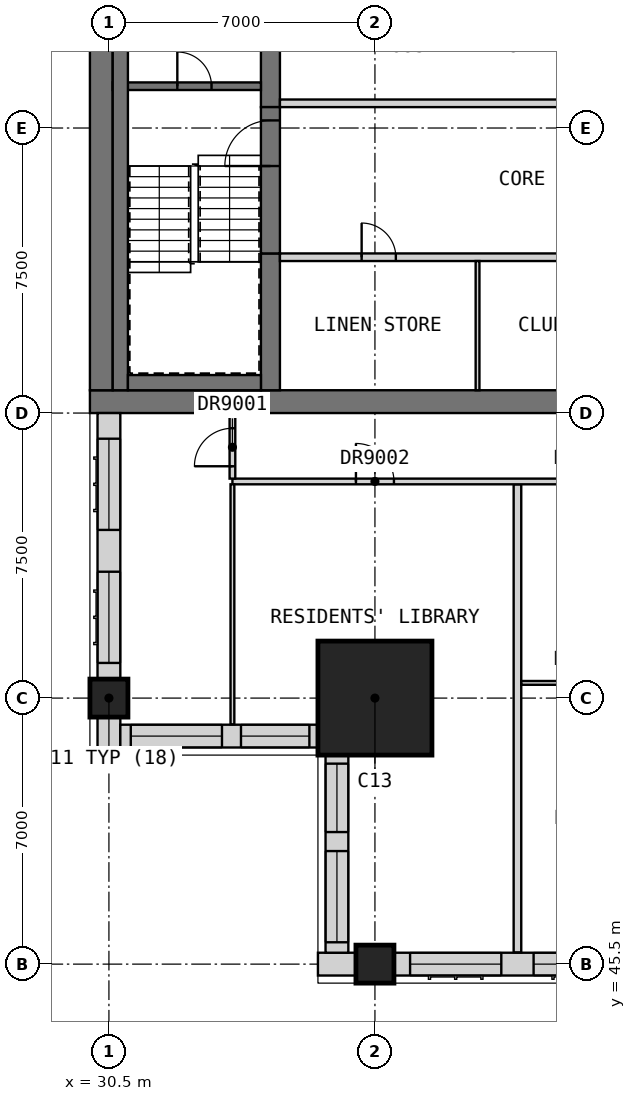
"""IFC4 building model, lengths in metres.
Left out: names, types, materials, properties, quantities, classifications, styles, units other than length and angle.
Written with IfcOpenShell. Run it as: python <this file> out.ifc"""

import sys

from ifc_helpers import new_model, si_unit, direction, frame, frame_2d, origin, origin_2d, place, context, subcontext, project, spatial, rectangle, extrude, element, fill, save


model = new_model("IFC4")
c1 = context("Model", 3, precision=1e-05, world=origin(), true_north=direction((0.0, 1.0)))
c2 = subcontext(c1, "Body", "Model", "MODEL_VIEW")
j1 = project(units=[si_unit("LENGTHUNIT", "METRE"), si_unit("PLANEANGLEUNIT", "RADIAN")], contexts=[c1])
p1 = place(None, origin())
s1 = spatial("IfcSite", under=j1, at=p1, CompositionType="ELEMENT")
p2 = place(p1, origin())
s2 = spatial("IfcBuilding", under=s1, at=p2, CompositionType="ELEMENT")
p3 = place(p2, frame((0.0, 0.0, 269.7)))
s3 = spatial("IfcBuildingStorey", under=s2, at=p3, CompositionType="ELEMENT", Elevation=269.7)
for number, where, z_axis, x_axis in (
    (1, (30.5, 52.5, 0.0), (0.0, 0.0, 1.0), (1.0, 0.0, 0.0)),
    (2, (37.5, 45.5, 0.0), (0.0, 0.0, 1.0), (1.0, 0.0, 0.0)),
):
    element("IfcColumn", number, at=place(p3, frame(where, z_axis=z_axis, x_axis=x_axis)), inside=s3, PredefinedType="COLUMN", context=c2, shape_type="SweptSolid", body=[
        extrude(rectangle(XDim=1.0, YDim=1.0, at=origin_2d()), origin(), (0.0, 0.0, 1.0), 3.5),
    ])
p4 = place(p3, frame((37.5, 52.5, 0.0), z_axis=(0.0, 0.0, 1.0), x_axis=(1.0, 0.0, 0.0)))
e3 = element("IfcColumn", 3, at=p4, inside=s3, PredefinedType="COLUMN", context=c2, shape_type="SweptSolid", body=[
    extrude(rectangle(XDim=3.0, YDim=3.0, at=origin_2d()), origin(), (0.0, 0.0, 1.0), 3.5),
])
p5 = place(p3, frame((30.0, 60.3, 0.0), z_axis=(0.0, 0.0, 1.0), x_axis=(1.0, 0.0, 0.0)))
e4 = element("IfcWall", 4, at=p5, inside=s3, PredefinedType="SHEAR", context=c2, shape_type="SweptSolid", body=[
    extrude(rectangle(XDim=30.0, YDim=0.6, at=frame_2d((15.0, 0.0))), origin(), (0.0, 0.0, 1.0), 3.5),
])
p6 = place(p5, frame((21.9, 0.0, 0.0)))
e5 = element("IfcOpeningElement", 5, at=p6, cuts=e4, PredefinedType="OPENING", context=c2, shape_type="SweptSolid", body=[
    extrude(rectangle(XDim=1.8, YDim=2.1, at=frame_2d((0.9, 1.05))), frame((0.0, 0.31, 0.0), z_axis=(0.0, -1.0, 0.0), x_axis=(1.0, 0.0, 0.0)), (0.0, 0.0, 1.0), 0.62),
])
p7 = place(p5, frame((26.5, 0.0, 0.0)))
e6 = element("IfcOpeningElement", 6, at=p7, cuts=e4, PredefinedType="OPENING", context=c2, shape_type="SweptSolid", body=[
    extrude(rectangle(XDim=1.2, YDim=2.1, at=frame_2d((0.6, 1.05))), frame((0.0, 0.31, 0.0), z_axis=(0.0, -1.0, 0.0), x_axis=(1.0, 0.0, 0.0)), (0.0, 0.0, 1.0), 0.62),
])
p8 = place(p3, frame((30.3, 60.6, 0.0), z_axis=(0.0, 0.0, 1.0), x_axis=(0.0, 1.0, 0.0)))
e7 = element("IfcWall", 7, at=p8, inside=s3, PredefinedType="SHEAR", context=c2, shape_type="SweptSolid", body=[
    extrude(rectangle(XDim=21.3, YDim=0.6, at=frame_2d((10.65, 0.0))), origin(), (0.0, 0.0, 1.0), 3.5),
])
p9 = place(p3, frame((34.75, 60.6, 0.0), z_axis=(0.0, 0.0, 1.0), x_axis=(0.0, 1.0, 0.0)))
e8 = element("IfcWall", 8, at=p9, inside=s3, PredefinedType="SHEAR", context=c2, shape_type="SweptSolid", body=[
    extrude(rectangle(XDim=3.6, YDim=0.5, at=frame_2d((1.8, 0.0))), origin(), (0.0, 0.0, 1.0), 3.5),
])
p10 = place(p3, frame((34.75, 68.05, 0.0), z_axis=(0.0, 0.0, 1.0), x_axis=(0.0, 1.0, 0.0)))
e9 = element("IfcWall", 9, at=p10, inside=s3, PredefinedType="SHEAR", context=c2, shape_type="SweptSolid", body=[
    extrude(rectangle(XDim=6.4, YDim=0.5, at=frame_2d((3.2, 0.0))), origin(), (0.0, 0.0, 1.0), 3.5),
])
p11 = place(p2, frame((0.0, 0.0, 34.0)))
s4 = spatial("IfcBuildingStorey", under=s2, at=p11, CompositionType="ELEMENT", Elevation=34.0)
for number, where, z_axis, x_axis in (
    (10, (29.7, 61.05, 0.0), (0.0, 0.0, 1.0), (0.0, 1.0, 0.0)),
    (11, (29.7, 65.925, 0.0), (0.0, 0.0, 1.0), (0.0, 1.0, 0.0)),
):
    element("IfcWall", number, at=place(p11, frame(where, z_axis=z_axis, x_axis=x_axis)), inside=s4, PredefinedType="SOLIDWALL", context=c2, shape_type="SweptSolid", body=[
        extrude(rectangle(XDim=0.9, YDim=0.6, at=frame_2d((0.45, 0.0))), origin(), (0.0, 0.0, 1.0), 286.2),
    ])
p12 = place(p3, frame((36.0, 45.5, 0.0), z_axis=(0.0, 0.0, 1.0), x_axis=(1.0, 0.0, 0.0)))
e12 = element("IfcWall", 12, at=p12, inside=s3, PredefinedType="SOLIDWALL", context=c2, shape_type="SweptSolid", body=[
    extrude(rectangle(XDim=1.0, YDim=0.6, at=frame_2d((0.5, 0.0))), origin(), (0.0, 0.0, 1.0), 3.25),
])
p13 = place(p3, frame((38.0, 45.5, 0.0), z_axis=(0.0, 0.0, 1.0), x_axis=(1.0, 0.0, 0.0)))
e13 = element("IfcWall", 13, at=p13, inside=s3, PredefinedType="SOLIDWALL", context=c2, shape_type="SweptSolid", body=[
    extrude(rectangle(XDim=6.5, YDim=0.6, at=frame_2d((3.25, 0.0))), origin(), (0.0, 0.0, 1.0), 2.75),
])
p14 = place(p13, frame((0.425, 0.0, 0.8)))
e14 = element("IfcOpeningElement", 14, at=p14, cuts=e13, PredefinedType="OPENING", context=c2, shape_type="SweptSolid", body=[
    extrude(rectangle(XDim=2.4, YDim=1.8, at=frame_2d((1.2, 0.9))), frame((0.0, 0.31, 0.0), z_axis=(0.0, -1.0, 0.0), x_axis=(1.0, 0.0, 0.0)), (0.0, 0.0, 1.0), 0.62),
])
p15 = place(p13, frame((3.675, 0.0, 0.8)))
e15 = element("IfcOpeningElement", 15, at=p15, cuts=e13, PredefinedType="OPENING", context=c2, shape_type="SweptSolid", body=[
    extrude(rectangle(XDim=2.4, YDim=1.8, at=frame_2d((1.2, 0.9))), frame((0.0, 0.31, 0.0), z_axis=(0.0, -1.0, 0.0), x_axis=(1.0, 0.0, 0.0)), (0.0, 0.0, 1.0), 0.62),
])
p16 = place(p3, frame((30.5, 60.0, 0.0), z_axis=(0.0, 0.0, 1.0), x_axis=(0.0, -1.0, 0.0)))
e16 = element("IfcWall", 16, at=p16, inside=s3, PredefinedType="SOLIDWALL", context=c2, shape_type="SweptSolid", body=[
    extrude(rectangle(XDim=7.0, YDim=0.6, at=frame_2d((3.5, 0.0))), origin(), (0.0, 0.0, 1.0), 3.25),
])
p17 = place(p16, frame((4.175, 0.0, 0.8)))
e17 = element("IfcOpeningElement", 17, at=p17, cuts=e16, PredefinedType="OPENING", context=c2, shape_type="SweptSolid", body=[
    extrude(rectangle(XDim=2.4, YDim=1.8, at=frame_2d((1.2, 0.9))), frame((0.0, 0.31, 0.0), z_axis=(0.0, -1.0, 0.0), x_axis=(1.0, 0.0, 0.0)), (0.0, 0.0, 1.0), 0.62),
])
p18 = place(p16, frame((0.675, 0.0, 0.8)))
e18 = element("IfcOpeningElement", 18, at=p18, cuts=e16, PredefinedType="OPENING", context=c2, shape_type="SweptSolid", body=[
    extrude(rectangle(XDim=2.4, YDim=1.8, at=frame_2d((1.2, 0.9))), frame((0.0, 0.31, 0.0), z_axis=(0.0, -1.0, 0.0), x_axis=(1.0, 0.0, 0.0)), (0.0, 0.0, 1.0), 0.62),
])
p19 = place(p3, frame((30.5, 52.0, 0.0), z_axis=(0.0, 0.0, 1.0), x_axis=(0.0, -1.0, 0.0)))
e19 = element("IfcWall", 19, at=p19, inside=s3, PredefinedType="SOLIDWALL", context=c2, shape_type="SweptSolid", body=[
    extrude(rectangle(XDim=1.0, YDim=0.6, at=frame_2d((0.5, 0.0))), origin(), (0.0, 0.0, 1.0), 3.25),
])
p20 = place(p3, frame((30.8, 51.5, 0.0), z_axis=(0.0, 0.0, 1.0), x_axis=(1.0, 0.0, 0.0)))
e20 = element("IfcWall", 20, at=p20, inside=s3, PredefinedType="SOLIDWALL", context=c2, shape_type="SweptSolid", body=[
    extrude(rectangle(XDim=5.2, YDim=0.6, at=frame_2d((2.6, 0.0))), origin(), (0.0, 0.0, 1.0), 3.25),
])
p21 = place(p20, frame((0.275, 0.0, 0.8)))
e21 = element("IfcOpeningElement", 21, at=p21, cuts=e20, PredefinedType="OPENING", context=c2, shape_type="SweptSolid", body=[
    extrude(rectangle(XDim=2.4, YDim=1.8, at=frame_2d((1.2, 0.9))), frame((0.0, 0.31, 0.0), z_axis=(0.0, -1.0, 0.0), x_axis=(1.0, 0.0, 0.0)), (0.0, 0.0, 1.0), 0.62),
])
p22 = place(p20, frame((3.175, 0.0, 0.8)))
e22 = element("IfcOpeningElement", 22, at=p22, cuts=e20, PredefinedType="OPENING", context=c2, shape_type="SweptSolid", body=[
    extrude(rectangle(XDim=1.8, YDim=1.8, at=frame_2d((0.9, 0.9))), frame((0.0, 0.31, 0.0), z_axis=(0.0, -1.0, 0.0), x_axis=(1.0, 0.0, 0.0)), (0.0, 0.0, 1.0), 0.62),
])
p23 = place(p3, frame((36.5, 51.0, 0.0), z_axis=(0.0, 0.0, 1.0), x_axis=(0.0, -1.0, 0.0)))
e23 = element("IfcWall", 23, at=p23, inside=s3, PredefinedType="SOLIDWALL", context=c2, shape_type="SweptSolid", body=[
    extrude(rectangle(XDim=5.2, YDim=0.6, at=frame_2d((2.6, 0.0))), origin(), (0.0, 0.0, 1.0), 3.25),
])
p24 = place(p23, frame((2.525, 0.0, 0.8)))
e24 = element("IfcOpeningElement", 24, at=p24, cuts=e23, PredefinedType="OPENING", context=c2, shape_type="SweptSolid", body=[
    extrude(rectangle(XDim=2.4, YDim=1.8, at=frame_2d((1.2, 0.9))), frame((0.0, 0.31, 0.0), z_axis=(0.0, -1.0, 0.0), x_axis=(1.0, 0.0, 0.0)), (0.0, 0.0, 1.0), 0.62),
])
p25 = place(p23, frame((0.225, 0.0, 0.8)))
e25 = element("IfcOpeningElement", 25, at=p25, cuts=e23, PredefinedType="OPENING", context=c2, shape_type="SweptSolid", body=[
    extrude(rectangle(XDim=1.8, YDim=1.8, at=frame_2d((0.9, 0.9))), frame((0.0, 0.31, 0.0), z_axis=(0.0, -1.0, 0.0), x_axis=(1.0, 0.0, 0.0)), (0.0, 0.0, 1.0), 0.62),
])
p26 = place(p3, frame((35.0, 64.1, 0.0), z_axis=(0.0, 0.0, 1.0), x_axis=(1.0, 0.0, 0.0)))
e26 = element("IfcWall", 26, at=p26, inside=s3, PredefinedType="PARTITIONING", context=c2, shape_type="SweptSolid", body=[
    extrude(rectangle(XDim=15.6, YDim=0.2, at=frame_2d((7.8, 0.0))), origin(), (0.0, 0.0, 1.0), 3.25),
])
p27 = place(p26, frame((2.15, 0.0, 0.0)))
e27 = element("IfcOpeningElement", 27, at=p27, cuts=e26, PredefinedType="OPENING", context=c2, shape_type="SweptSolid", body=[
    extrude(rectangle(XDim=0.9, YDim=2.1, at=frame_2d((0.45, 1.05))), frame((0.0, 0.11, 0.0), z_axis=(0.0, -1.0, 0.0), x_axis=(1.0, 0.0, 0.0)), (0.0, 0.0, 1.0), 0.22),
])
p28 = place(p26, frame((7.35, 0.0, 0.0)))
e28 = element("IfcOpeningElement", 28, at=p28, cuts=e26, PredefinedType="OPENING", context=c2, shape_type="SweptSolid", body=[
    extrude(rectangle(XDim=0.9, YDim=2.1, at=frame_2d((0.45, 1.05))), frame((0.0, 0.11, 0.0), z_axis=(0.0, -1.0, 0.0), x_axis=(1.0, 0.0, 0.0)), (0.0, 0.0, 1.0), 0.22),
])
p29 = place(p26, frame((12.55, 0.0, 0.0)))
e29 = element("IfcOpeningElement", 29, at=p29, cuts=e26, PredefinedType="OPENING", context=c2, shape_type="SweptSolid", body=[
    extrude(rectangle(XDim=0.9, YDim=2.1, at=frame_2d((0.45, 1.05))), frame((0.0, 0.11, 0.0), z_axis=(0.0, -1.0, 0.0), x_axis=(1.0, 0.0, 0.0)), (0.0, 0.0, 1.0), 0.22),
])
p30 = place(p3, frame((40.2, 60.6, 0.0), z_axis=(0.0, 0.0, 1.0), x_axis=(0.0, 1.0, 0.0)))
e30 = element("IfcWall", 30, at=p30, inside=s3, PredefinedType="PARTITIONING", context=c2, shape_type="SweptSolid", body=[
    extrude(rectangle(XDim=3.4, YDim=0.1, at=frame_2d((1.7, 0.0))), origin(), (0.0, 0.0, 1.0), 3.25),
])
p31 = place(p3, frame((35.0, 68.15, 0.0), z_axis=(0.0, 0.0, 1.0), x_axis=(1.0, 0.0, 0.0)))
e31 = element("IfcWall", 31, at=p31, inside=s3, PredefinedType="PARTITIONING", context=c2, shape_type="SweptSolid", body=[
    extrude(rectangle(XDim=15.6, YDim=0.2, at=frame_2d((7.8, 0.0))), origin(), (0.0, 0.0, 1.0), 3.25),
])
p32 = place(p31, frame((7.35, 0.0, 0.0)))
e32 = element("IfcOpeningElement", 32, at=p32, cuts=e31, PredefinedType="OPENING", context=c2, shape_type="SweptSolid", body=[
    extrude(rectangle(XDim=0.9, YDim=2.1, at=frame_2d((0.45, 1.05))), frame((0.0, 0.11, 0.0), z_axis=(0.0, -1.0, 0.0), x_axis=(1.0, 0.0, 0.0)), (0.0, 0.0, 1.0), 0.22),
])
p33 = place(p3, frame((34.75, 64.2, 0.0), z_axis=(0.0, 0.0, 1.0), x_axis=(0.0, 1.0, 0.0)))
e33 = element("IfcWall", 33, at=p33, inside=s3, PredefinedType="SOLIDWALL", context=c2, shape_type="SweptSolid", body=[
    extrude(rectangle(XDim=3.85, YDim=0.5, at=frame_2d((1.925, 0.0))), origin(), (0.0, 0.0, 1.0), 2.3),
])
p34 = place(p33, frame((2.3, 0.0, 0.0)))
e34 = element("IfcOpeningElement", 34, at=p34, cuts=e33, PredefinedType="OPENING", context=c2, shape_type="SweptSolid", body=[
    extrude(rectangle(XDim=1.2, YDim=2.1, at=frame_2d((0.6, 1.05))), frame((0.0, 0.26, 0.0), z_axis=(0.0, -1.0, 0.0), x_axis=(1.0, 0.0, 0.0)), (0.0, 0.0, 1.0), 0.52),
])
p35 = place(p3, frame((30.6, 68.6, 0.0), z_axis=(0.0, 0.0, 1.0), x_axis=(1.0, 0.0, 0.0)))
e35 = element("IfcWall", 35, at=p35, inside=s3, PredefinedType="SOLIDWALL", context=c2, shape_type="SweptSolid", body=[
    extrude(rectangle(XDim=3.9, YDim=0.2, at=frame_2d((1.95, 0.0))), origin(), (0.0, 0.0, 1.0), 3.25),
])
p36 = place(p35, frame((1.7, 0.0, 0.0)))
e36 = element("IfcOpeningElement", 36, at=p36, cuts=e35, PredefinedType="OPENING", context=c2, shape_type="SweptSolid", body=[
    extrude(rectangle(XDim=0.9, YDim=2.1, at=frame_2d((0.45, 1.05))), frame((0.0, 0.11, 0.0), z_axis=(0.0, -1.0, 0.0), x_axis=(1.0, 0.0, 0.0)), (0.0, 0.0, 1.0), 0.22),
])
p37 = place(p3, frame((30.8, 60.6, 0.0), z_axis=(0.0, 0.0, 1.0), x_axis=(0.0, 1.0, 0.0)))
e37 = element("IfcWall", 37, at=p37, inside=s3, PredefinedType="SOLIDWALL", context=c2, shape_type="SweptSolid", body=[
    extrude(rectangle(XDim=21.3, YDim=0.4, at=frame_2d((10.65, 0.0))), origin(), (0.0, 0.0, 1.0), 3.25),
])
p38 = place(p3, frame((31.0, 60.8, 0.0), z_axis=(0.0, 0.0, 1.0), x_axis=(1.0, 0.0, 0.0)))
e38 = element("IfcWall", 38, at=p38, inside=s3, PredefinedType="SOLIDWALL", context=c2, shape_type="SweptSolid", body=[
    extrude(rectangle(XDim=3.5, YDim=0.4, at=frame_2d((1.75, 0.0))), origin(), (0.0, 0.0, 1.0), 3.25),
])
p39 = place(p3, frame((41.25, 45.81, 0.0), z_axis=(0.0, 0.0, 1.0), x_axis=(0.0, 1.0, 0.0)))
e39 = element("IfcWall", 39, at=p39, inside=s3, PredefinedType="PARTITIONING", context=c2, shape_type="SweptSolid", body=[
    extrude(rectangle(XDim=12.315, YDim=0.2, at=frame_2d((6.157, 0.0))), origin(), (0.0, 0.0, 1.0), 3.25),
])
p40 = place(p3, frame((33.75, 58.2, 0.0), z_axis=(0.0, 0.0, 1.0), x_axis=(1.0, 0.0, 0.0)))
e40 = element("IfcWall", 40, at=p40, inside=s3, PredefinedType="PARTITIONING", context=c2, shape_type="SweptSolid", body=[
    extrude(rectangle(XDim=28.05, YDim=0.15, at=frame_2d((14.025, 0.0))), origin(), (0.0, 0.0, 1.0), 3.25),
])
p41 = place(p40, frame((3.25, 0.0, 0.0)))
e41 = element("IfcOpeningElement", 41, at=p41, cuts=e40, PredefinedType="OPENING", context=c2, shape_type="SweptSolid", body=[
    extrude(rectangle(XDim=1.0, YDim=2.1, at=frame_2d((0.5, 1.05))), frame((0.0, 0.085, 0.0), z_axis=(0.0, -1.0, 0.0), x_axis=(1.0, 0.0, 0.0)), (0.0, 0.0, 1.0), 0.17),
])
p42 = place(p40, frame((8.925, 0.0, 0.0)))
e42 = element("IfcOpeningElement", 42, at=p42, cuts=e40, PredefinedType="OPENING", context=c2, shape_type="SweptSolid", body=[
    extrude(rectangle(XDim=0.9, YDim=2.1, at=frame_2d((0.45, 1.05))), frame((0.0, 0.085, 0.0), z_axis=(0.0, -1.0, 0.0), x_axis=(1.0, 0.0, 0.0)), (0.0, 0.0, 1.0), 0.17),
])
p43 = place(p40, frame((20.175, 0.0, 0.0)))
e43 = element("IfcOpeningElement", 43, at=p43, cuts=e40, PredefinedType="OPENING", context=c2, shape_type="SweptSolid", body=[
    extrude(rectangle(XDim=0.9, YDim=2.1, at=frame_2d((0.45, 1.05))), frame((0.0, 0.085, 0.0), z_axis=(0.0, -1.0, 0.0), x_axis=(1.0, 0.0, 0.0)), (0.0, 0.0, 1.0), 0.17),
])
p44 = place(p40, frame((26.65, 0.0, 0.0)))
e44 = element("IfcOpeningElement", 44, at=p44, cuts=e40, PredefinedType="OPENING", context=c2, shape_type="SweptSolid", body=[
    extrude(rectangle(XDim=1.0, YDim=2.1, at=frame_2d((0.5, 1.05))), frame((0.0, 0.085, 0.0), z_axis=(0.0, -1.0, 0.0), x_axis=(1.0, 0.0, 0.0)), (0.0, 0.0, 1.0), 0.17),
])
p45 = place(p3, frame((33.75, 58.275, 0.0), z_axis=(0.0, 0.0, 1.0), x_axis=(0.0, 1.0, 0.0)))
e45 = element("IfcWall", 45, at=p45, inside=s3, PredefinedType="PARTITIONING", context=c2, shape_type="SweptSolid", body=[
    extrude(rectangle(XDim=1.725, YDim=0.15, at=frame_2d((0.863, 0.0))), origin(), (0.0, 0.0, 1.0), 3.25),
])
p46 = place(p45, frame((0.325, 0.0, 0.0)))
e46 = element("IfcOpeningElement", 46, at=p46, cuts=e45, PredefinedType="OPENING", context=c2, shape_type="SweptSolid", body=[
    extrude(rectangle(XDim=1.0, YDim=2.1, at=frame_2d((0.5, 1.05))), frame((0.0, 0.085, 0.0), z_axis=(0.0, -1.0, 0.0), x_axis=(1.0, 0.0, 0.0)), (0.0, 0.0, 1.0), 0.17),
])
p47 = place(p3, frame((41.35, 52.9, 0.0), z_axis=(0.0, 0.0, 1.0), x_axis=(1.0, 0.0, 0.0)))
e47 = element("IfcWall", 47, at=p47, inside=s3, PredefinedType="PARTITIONING", context=c2, shape_type="SweptSolid", body=[
    extrude(rectangle(XDim=18.55, YDim=0.1, at=frame_2d((9.275, 0.0))), origin(), (0.0, 0.0, 1.0), 3.25),
])
p48 = place(p47, frame((1.325, 0.0, 0.0)))
e48 = element("IfcOpeningElement", 48, at=p48, cuts=e47, PredefinedType="OPENING", context=c2, shape_type="SweptSolid", body=[
    extrude(rectangle(XDim=0.9, YDim=2.1, at=frame_2d((0.45, 1.05))), frame((0.0, 0.06, 0.0), z_axis=(0.0, -1.0, 0.0), x_axis=(1.0, 0.0, 0.0)), (0.0, 0.0, 1.0), 0.12),
])
p49 = place(p47, frame((8.825, 0.0, 0.0)))
e49 = element("IfcOpeningElement", 49, at=p49, cuts=e47, PredefinedType="OPENING", context=c2, shape_type="SweptSolid", body=[
    extrude(rectangle(XDim=0.9, YDim=2.1, at=frame_2d((0.45, 1.05))), frame((0.0, 0.06, 0.0), z_axis=(0.0, -1.0, 0.0), x_axis=(1.0, 0.0, 0.0)), (0.0, 0.0, 1.0), 0.12),
])
p50 = place(p47, frame((12.575, 0.0, 0.0)))
e50 = element("IfcOpeningElement", 50, at=p50, cuts=e47, PredefinedType="OPENING", context=c2, shape_type="SweptSolid", body=[
    extrude(rectangle(XDim=0.9, YDim=2.1, at=frame_2d((0.45, 1.05))), frame((0.0, 0.06, 0.0), z_axis=(0.0, -1.0, 0.0), x_axis=(1.0, 0.0, 0.0)), (0.0, 0.0, 1.0), 0.12),
])
p51 = place(p3, frame((33.75, 51.81, 0.0), z_axis=(0.0, 0.0, 1.0), x_axis=(0.0, 1.0, 0.0)))
e51 = element("IfcWall", 51, at=p51, inside=s3, PredefinedType="PARTITIONING", context=c2, shape_type="SweptSolid", body=[
    extrude(rectangle(XDim=6.315, YDim=0.1, at=frame_2d((3.157, 0.0))), origin(), (0.0, 0.0, 1.0), 3.25),
])
p52 = place(p14, origin())
e52 = element("IfcWindow", 52, at=p52, inside=s3, PartitioningType="SINGLE_PANEL", PredefinedType="WINDOW", context=c2, shape_type="SweptSolid", body=[
    extrude(rectangle(XDim=2.4, YDim=1.8, at=frame_2d((1.2, 0.9))), frame((0.0, -0.07, 0.0), z_axis=(0.0, -1.0, 0.0), x_axis=(1.0, 0.0, 0.0)), (0.0, 0.0, 1.0), 0.06),
])
fill(e14, e52)
p53 = place(p15, origin())
e53 = element("IfcWindow", 53, at=p53, inside=s3, PartitioningType="SINGLE_PANEL", PredefinedType="WINDOW", context=c2, shape_type="SweptSolid", body=[
    extrude(rectangle(XDim=2.4, YDim=1.8, at=frame_2d((1.2, 0.9))), frame((0.0, -0.07, 0.0), z_axis=(0.0, -1.0, 0.0), x_axis=(1.0, 0.0, 0.0)), (0.0, 0.0, 1.0), 0.06),
])
fill(e15, e53)
p54 = place(p17, origin())
e54 = element("IfcWindow", 54, at=p54, inside=s3, PartitioningType="SINGLE_PANEL", PredefinedType="WINDOW", context=c2, shape_type="SweptSolid", body=[
    extrude(rectangle(XDim=2.4, YDim=1.8, at=frame_2d((1.2, 0.9))), frame((0.0, -0.07, 0.0), z_axis=(0.0, -1.0, 0.0), x_axis=(1.0, 0.0, 0.0)), (0.0, 0.0, 1.0), 0.06),
])
fill(e17, e54)
p55 = place(p18, origin())
e55 = element("IfcWindow", 55, at=p55, inside=s3, PartitioningType="SINGLE_PANEL", PredefinedType="WINDOW", context=c2, shape_type="SweptSolid", body=[
    extrude(rectangle(XDim=2.4, YDim=1.8, at=frame_2d((1.2, 0.9))), frame((0.0, -0.07, 0.0), z_axis=(0.0, -1.0, 0.0), x_axis=(1.0, 0.0, 0.0)), (0.0, 0.0, 1.0), 0.06),
])
fill(e18, e55)
p56 = place(p21, origin())
e56 = element("IfcWindow", 56, at=p56, inside=s3, PartitioningType="SINGLE_PANEL", PredefinedType="WINDOW", context=c2, shape_type="SweptSolid", body=[
    extrude(rectangle(XDim=2.4, YDim=1.8, at=frame_2d((1.2, 0.9))), frame((0.0, -0.07, 0.0), z_axis=(0.0, -1.0, 0.0), x_axis=(1.0, 0.0, 0.0)), (0.0, 0.0, 1.0), 0.06),
])
fill(e21, e56)
p57 = place(p22, origin())
e57 = element("IfcWindow", 57, at=p57, inside=s3, PartitioningType="SINGLE_PANEL", PredefinedType="WINDOW", context=c2, shape_type="SweptSolid", body=[
    extrude(rectangle(XDim=1.8, YDim=1.8, at=frame_2d((0.9, 0.9))), frame((0.0, -0.07, 0.0), z_axis=(0.0, -1.0, 0.0), x_axis=(1.0, 0.0, 0.0)), (0.0, 0.0, 1.0), 0.06),
])
fill(e22, e57)
p58 = place(p24, origin())
e58 = element("IfcWindow", 58, at=p58, inside=s3, PartitioningType="SINGLE_PANEL", PredefinedType="WINDOW", context=c2, shape_type="SweptSolid", body=[
    extrude(rectangle(XDim=2.4, YDim=1.8, at=frame_2d((1.2, 0.9))), frame((0.0, -0.07, 0.0), z_axis=(0.0, -1.0, 0.0), x_axis=(1.0, 0.0, 0.0)), (0.0, 0.0, 1.0), 0.06),
])
fill(e24, e58)
p59 = place(p25, origin())
e59 = element("IfcWindow", 59, at=p59, inside=s3, PartitioningType="SINGLE_PANEL", PredefinedType="WINDOW", context=c2, shape_type="SweptSolid", body=[
    extrude(rectangle(XDim=1.8, YDim=1.8, at=frame_2d((0.9, 0.9))), frame((0.0, -0.07, 0.0), z_axis=(0.0, -1.0, 0.0), x_axis=(1.0, 0.0, 0.0)), (0.0, 0.0, 1.0), 0.06),
])
fill(e25, e59)
p60 = place(p27, origin())
e60 = element("IfcDoor", 60, at=p60, inside=s3, OperationType="SINGLE_SWING_LEFT", PredefinedType="DOOR", context=c2, shape_type="SweptSolid", body=[
    extrude(rectangle(XDim=0.9, YDim=2.1, at=frame_2d((0.45, 1.05))), frame((0.0, 0.025, 0.0), z_axis=(0.0, -1.0, 0.0), x_axis=(1.0, 0.0, 0.0)), (0.0, 0.0, 1.0), 0.05),
])
fill(e27, e60)
p61 = place(p34, origin())
e61 = element("IfcDoor", 61, at=p61, inside=s3, OperationType="SINGLE_SWING_LEFT", PredefinedType="DOOR", context=c2, shape_type="SweptSolid", body=[
    extrude(rectangle(XDim=1.2, YDim=2.1, at=frame_2d((0.6, 1.05))), frame((0.0, 0.025, 0.0), z_axis=(0.0, -1.0, 0.0), x_axis=(1.0, 0.0, 0.0)), (0.0, 0.0, 1.0), 0.05),
])
fill(e34, e61)
p62 = place(p36, origin())
e62 = element("IfcDoor", 62, at=p62, inside=s3, OperationType="SINGLE_SWING_LEFT", PredefinedType="DOOR", context=c2, shape_type="SweptSolid", body=[
    extrude(rectangle(XDim=0.9, YDim=2.1, at=frame_2d((0.45, 1.05))), frame((0.0, 0.025, 0.0), z_axis=(0.0, -1.0, 0.0), x_axis=(1.0, 0.0, 0.0)), (0.0, 0.0, 1.0), 0.05),
])
fill(e36, e62)
p63 = place(p46, origin())
e63 = element("IfcDoor", 63, at=p63, inside=s3, OperationType="SINGLE_SWING_RIGHT", PredefinedType="DOOR", context=c2, shape_type="SweptSolid", body=[
    extrude(rectangle(XDim=1.0, YDim=2.1, at=frame_2d((0.5, 1.05))), frame((0.0, 0.025, 0.0), z_axis=(0.0, -1.0, 0.0), x_axis=(1.0, 0.0, 0.0)), (0.0, 0.0, 1.0), 0.05),
])
fill(e46, e63)
p64 = place(p41, origin())
e64 = element("IfcDoor", 64, at=p64, inside=s3, OperationType="SINGLE_SWING_RIGHT", PredefinedType="DOOR", context=c2, shape_type="SweptSolid", body=[
    extrude(rectangle(XDim=1.0, YDim=2.1, at=frame_2d((0.5, 1.05))), frame((0.0, 0.025, 0.0), z_axis=(0.0, -1.0, 0.0), x_axis=(1.0, 0.0, 0.0)), (0.0, 0.0, 1.0), 0.05),
])
fill(e41, e64)
save(model, sys.argv[1])
